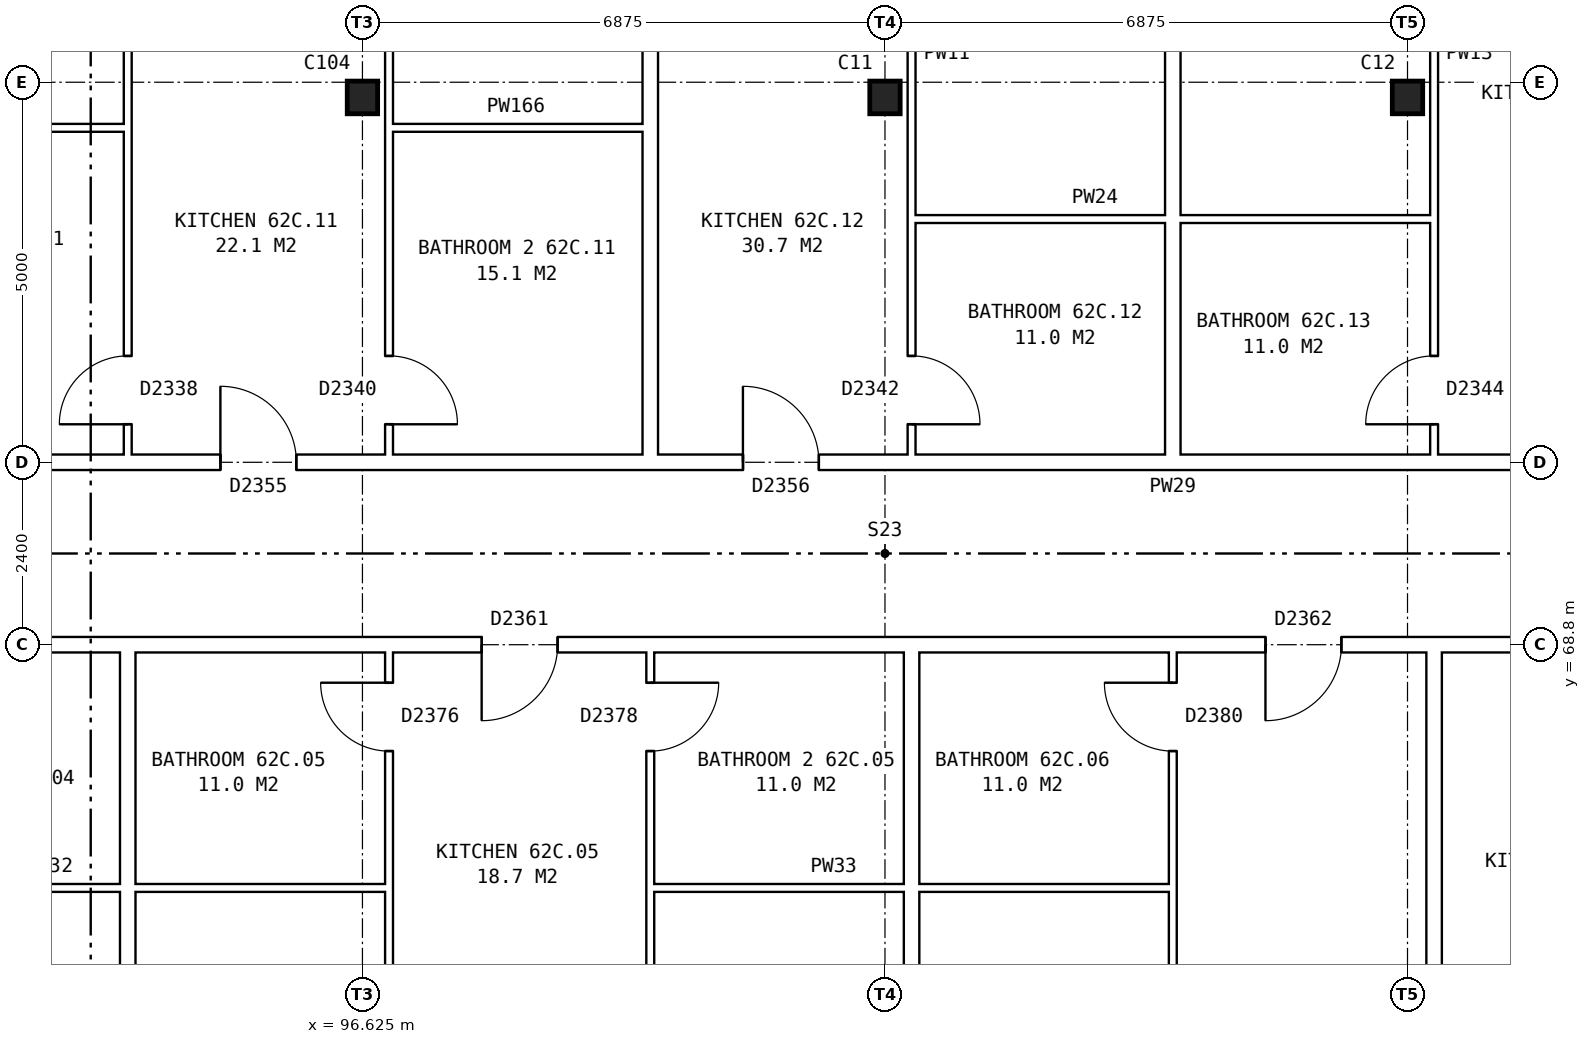
"""IFC4 building model, lengths in metres.
Left out: names, types, materials, properties, quantities, classifications, styles, units other than length and angle.
Written with IfcOpenShell. Run it as: python <this file> out.ifc"""

import sys

from ifc_helpers import new_model, si_unit, direction, frame, frame_2d, origin, origin_2d, place, context, subcontext, project, spatial, rectangle, i_section, extrude, element, fill, save


model = new_model("IFC4")
c1 = context("Model", 3, precision=1e-05, world=origin(), true_north=direction((0.0, 1.0)))
c2 = subcontext(c1, "Body", "Model", "MODEL_VIEW")
j1 = project(units=[si_unit("LENGTHUNIT", "METRE"), si_unit("PLANEANGLEUNIT", "RADIAN")], contexts=[c1])
p1 = place(None, origin())
s1 = spatial("IfcSite", under=j1, at=p1, CompositionType="ELEMENT")
p2 = place(p1, origin())
s2 = spatial("IfcBuilding", under=s1, at=p2, CompositionType="ELEMENT")
p3 = place(p2, frame((0.0, 0.0, 221.4)))
s3 = spatial("IfcBuildingStorey", under=s2, at=p3, CompositionType="ELEMENT", Elevation=221.4)
for number, where, z_axis, x_axis in (
    (1, (96.625, 76.0, 0.0), (0.0, 0.0, 1.0), (1.0, 0.0, 0.0)),
    (2, (103.5, 76.0, 0.0), (0.0, 0.0, 1.0), (1.0, 0.0, 0.0)),
    (3, (110.375, 76.0, 0.0), (0.0, 0.0, 1.0), (1.0, 0.0, 0.0)),
):
    element("IfcColumn", number, at=place(p3, frame(where, z_axis=z_axis, x_axis=x_axis)), inside=s3, PredefinedType="COLUMN", context=c2, shape_type="SweptSolid", body=[
        extrude(i_section(OverallWidth=0.4, OverallDepth=0.43, WebThickness=0.04, FlangeThickness=0.04, at=origin_2d()), origin(), (0.0, 0.0, 1.0), 2.85),
    ])
for number, where, z_axis, x_axis in (
    (4, (90.1, 65.6, 0.0), (0.0, 0.0, 1.0), (1.0, 0.0, 0.0)),
    (5, (100.412, 65.6, 0.0), (0.0, 0.0, 1.0), (1.0, 0.0, 0.0)),
):
    element("IfcWall", number, at=place(p3, frame(where, z_axis=z_axis, x_axis=x_axis)), inside=s3, PredefinedType="PARTITIONING", context=c2, shape_type="SweptSolid", body=[
        extrude(rectangle(XDim=6.875, YDim=0.1, at=frame_2d((3.438, 0.0))), origin(), (0.0, 0.0, 1.0), 2.85),
    ])
p4 = place(p3, frame((75.64, 68.8, 0.0), z_axis=(0.0, 0.0, 1.0), x_axis=(1.0, 0.0, 0.0)))
e6 = element("IfcWall", 6, at=p4, inside=s3, PredefinedType="PARTITIONING", context=c2, shape_type="SweptSolid", body=[
    extrude(rectangle(XDim=55.72, YDim=0.2, at=frame_2d((27.86, 0.0))), origin(), (0.0, 0.0, 1.0), 2.85),
])
p5 = place(p4, frame((1.399, 0.0, 0.0)))
e7 = element("IfcOpeningElement", 7, at=p5, cuts=e6, PredefinedType="OPENING", context=c2, shape_type="SweptSolid", body=[
    extrude(rectangle(XDim=1.0, YDim=2.1, at=frame_2d((0.5, 1.05))), frame((0.0, 0.11, 0.0), z_axis=(0.0, -1.0, 0.0), x_axis=(1.0, 0.0, 0.0)), (0.0, 0.0, 1.0), 0.22),
])
p6 = place(p4, frame((12.241, 0.0, 0.0)))
e8 = element("IfcOpeningElement", 8, at=p6, cuts=e6, PredefinedType="OPENING", context=c2, shape_type="SweptSolid", body=[
    extrude(rectangle(XDim=1.0, YDim=2.1, at=frame_2d((0.5, 1.05))), frame((0.0, 0.11, 0.0), z_axis=(0.0, -1.0, 0.0), x_axis=(1.0, 0.0, 0.0)), (0.0, 0.0, 1.0), 0.22),
])
p7 = place(p4, frame((22.553, 0.0, 0.0)))
e9 = element("IfcOpeningElement", 9, at=p7, cuts=e6, PredefinedType="OPENING", context=c2, shape_type="SweptSolid", body=[
    extrude(rectangle(XDim=1.0, YDim=2.1, at=frame_2d((0.5, 1.05))), frame((0.0, 0.11, 0.0), z_axis=(0.0, -1.0, 0.0), x_axis=(1.0, 0.0, 0.0)), (0.0, 0.0, 1.0), 0.22),
])
p8 = place(p4, frame((32.866, 0.0, 0.0)))
e10 = element("IfcOpeningElement", 10, at=p8, cuts=e6, PredefinedType="OPENING", context=c2, shape_type="SweptSolid", body=[
    extrude(rectangle(XDim=1.0, YDim=2.1, at=frame_2d((0.5, 1.05))), frame((0.0, 0.11, 0.0), z_axis=(0.0, -1.0, 0.0), x_axis=(1.0, 0.0, 0.0)), (0.0, 0.0, 1.0), 0.22),
])
p9 = place(p4, frame((36.303, 0.0, 0.0)))
e11 = element("IfcOpeningElement", 11, at=p9, cuts=e6, PredefinedType="OPENING", context=c2, shape_type="SweptSolid", body=[
    extrude(rectangle(XDim=1.0, YDim=2.1, at=frame_2d((0.5, 1.05))), frame((0.0, 0.11, 0.0), z_axis=(0.0, -1.0, 0.0), x_axis=(1.0, 0.0, 0.0)), (0.0, 0.0, 1.0), 0.22),
])
p10 = place(p4, frame((46.616, 0.0, 0.0)))
e12 = element("IfcOpeningElement", 12, at=p10, cuts=e6, PredefinedType="OPENING", context=c2, shape_type="SweptSolid", body=[
    extrude(rectangle(XDim=1.0, YDim=2.1, at=frame_2d((0.5, 1.05))), frame((0.0, 0.11, 0.0), z_axis=(0.0, -1.0, 0.0), x_axis=(1.0, 0.0, 0.0)), (0.0, 0.0, 1.0), 0.22),
])
p11 = place(p4, frame((50.053, 0.0, 0.0)))
e13 = element("IfcOpeningElement", 13, at=p11, cuts=e6, PredefinedType="OPENING", context=c2, shape_type="SweptSolid", body=[
    extrude(rectangle(XDim=1.0, YDim=2.1, at=frame_2d((0.5, 1.05))), frame((0.0, 0.11, 0.0), z_axis=(0.0, -1.0, 0.0), x_axis=(1.0, 0.0, 0.0)), (0.0, 0.0, 1.0), 0.22),
])
p12 = place(p3, frame((83.225, 71.2, 0.0), z_axis=(0.0, 0.0, 1.0), x_axis=(1.0, 0.0, 0.0)))
e14 = element("IfcWall", 14, at=p12, inside=s3, PredefinedType="PARTITIONING", context=c2, shape_type="SweptSolid", body=[
    extrude(rectangle(XDim=41.25, YDim=0.2, at=frame_2d((20.625, 0.0))), origin(), (0.0, 0.0, 1.0), 2.85),
])
p13 = place(p12, frame((4.656, 0.0, 0.0)))
e15 = element("IfcOpeningElement", 15, at=p13, cuts=e14, PredefinedType="OPENING", context=c2, shape_type="SweptSolid", body=[
    extrude(rectangle(XDim=1.0, YDim=2.1, at=frame_2d((0.5, 1.05))), frame((0.0, 0.11, 0.0), z_axis=(0.0, -1.0, 0.0), x_axis=(1.0, 0.0, 0.0)), (0.0, 0.0, 1.0), 0.22),
])
p14 = place(p12, frame((11.531, 0.0, 0.0)))
e16 = element("IfcOpeningElement", 16, at=p14, cuts=e14, PredefinedType="OPENING", context=c2, shape_type="SweptSolid", body=[
    extrude(rectangle(XDim=1.0, YDim=2.1, at=frame_2d((0.5, 1.05))), frame((0.0, 0.11, 0.0), z_axis=(0.0, -1.0, 0.0), x_axis=(1.0, 0.0, 0.0)), (0.0, 0.0, 1.0), 0.22),
])
p15 = place(p12, frame((18.406, 0.0, 0.0)))
e17 = element("IfcOpeningElement", 17, at=p15, cuts=e14, PredefinedType="OPENING", context=c2, shape_type="SweptSolid", body=[
    extrude(rectangle(XDim=1.0, YDim=2.1, at=frame_2d((0.5, 1.05))), frame((0.0, 0.11, 0.0), z_axis=(0.0, -1.0, 0.0), x_axis=(1.0, 0.0, 0.0)), (0.0, 0.0, 1.0), 0.22),
])
p16 = place(p12, frame((28.719, 0.0, 0.0)))
e18 = element("IfcOpeningElement", 18, at=p16, cuts=e14, PredefinedType="OPENING", context=c2, shape_type="SweptSolid", body=[
    extrude(rectangle(XDim=1.0, YDim=2.1, at=frame_2d((0.5, 1.05))), frame((0.0, 0.11, 0.0), z_axis=(0.0, -1.0, 0.0), x_axis=(1.0, 0.0, 0.0)), (0.0, 0.0, 1.0), 0.22),
])
p17 = place(p12, frame((35.594, 0.0, 0.0)))
e19 = element("IfcOpeningElement", 19, at=p17, cuts=e14, PredefinedType="OPENING", context=c2, shape_type="SweptSolid", body=[
    extrude(rectangle(XDim=1.0, YDim=2.1, at=frame_2d((0.5, 1.05))), frame((0.0, 0.11, 0.0), z_axis=(0.0, -1.0, 0.0), x_axis=(1.0, 0.0, 0.0)), (0.0, 0.0, 1.0), 0.22),
])
p18 = place(p3, frame((103.85, 74.4, 0.0), z_axis=(0.0, 0.0, 1.0), x_axis=(1.0, 0.0, 0.0)))
e20 = element("IfcWall", 20, at=p18, inside=s3, PredefinedType="PARTITIONING", context=c2, shape_type="SweptSolid", body=[
    extrude(rectangle(XDim=6.875, YDim=0.1, at=frame_2d((3.438, 0.0))), origin(), (0.0, 0.0, 1.0), 2.85),
])
p19 = place(p3, frame((90.2, 75.6, 0.0), z_axis=(0.0, 0.0, 1.0), x_axis=(1.0, 0.0, 0.0)))
e21 = element("IfcWall", 21, at=p19, inside=s3, PredefinedType="PARTITIONING", context=c2, shape_type="SweptSolid", body=[
    extrude(rectangle(XDim=3.337, YDim=0.1, at=frame_2d((1.668, 0.0))), origin(), (0.0, 0.0, 1.0), 2.85),
])
p20 = place(p3, frame((96.975, 75.6, 0.0), z_axis=(0.0, 0.0, 1.0), x_axis=(1.0, 0.0, 0.0)))
e22 = element("IfcWall", 22, at=p20, inside=s3, PredefinedType="PARTITIONING", context=c2, shape_type="SweptSolid", body=[
    extrude(rectangle(XDim=3.337, YDim=0.1, at=frame_2d((1.668, 0.0))), origin(), (0.0, 0.0, 1.0), 2.85),
])
p21 = place(p3, frame((93.537, 54.36, 0.0), z_axis=(0.0, 0.0, 1.0), x_axis=(0.0, 1.0, 0.0)))
e23 = element("IfcWall", 23, at=p21, inside=s3, PredefinedType="PARTITIONING", context=c2, shape_type="SweptSolid", body=[
    extrude(rectangle(XDim=14.34, YDim=0.2, at=frame_2d((7.17, 0.0))), origin(), (0.0, 0.0, 1.0), 2.85),
])
p22 = place(p3, frame((93.537, 71.3, 0.0), z_axis=(0.0, 0.0, 1.0), x_axis=(0.0, 1.0, 0.0)))
e24 = element("IfcWall", 24, at=p22, inside=s3, PredefinedType="PARTITIONING", context=c2, shape_type="SweptSolid", body=[
    extrude(rectangle(XDim=14.34, YDim=0.1, at=frame_2d((7.17, 0.0))), origin(), (0.0, 0.0, 1.0), 2.85),
])
p23 = place(p22, frame((6.74, 0.0, 0.0)))
e25 = element("IfcOpeningElement", 25, at=p23, cuts=e24, PredefinedType="OPENING", context=c2, shape_type="SweptSolid", body=[
    extrude(rectangle(XDim=0.9, YDim=2.1, at=frame_2d((0.45, 1.05))), frame((0.0, 0.06, 0.0), z_axis=(0.0, -1.0, 0.0), x_axis=(1.0, 0.0, 0.0)), (0.0, 0.0, 1.0), 0.12),
])
p24 = place(p22, frame((0.4, 0.0, 0.0)))
e26 = element("IfcOpeningElement", 26, at=p24, cuts=e24, PredefinedType="OPENING", context=c2, shape_type="SweptSolid", body=[
    extrude(rectangle(XDim=0.9, YDim=2.1, at=frame_2d((0.45, 1.05))), frame((0.0, 0.06, 0.0), z_axis=(0.0, -1.0, 0.0), x_axis=(1.0, 0.0, 0.0)), (0.0, 0.0, 1.0), 0.12),
])
p25 = place(p3, frame((96.975, 54.36, 0.0), z_axis=(0.0, 0.0, 1.0), x_axis=(0.0, 1.0, 0.0)))
e27 = element("IfcWall", 27, at=p25, inside=s3, PredefinedType="PARTITIONING", context=c2, shape_type="SweptSolid", body=[
    extrude(rectangle(XDim=14.34, YDim=0.1, at=frame_2d((7.17, 0.0))), origin(), (0.0, 0.0, 1.0), 2.85),
])
p26 = place(p25, frame((7.7, 0.0, 0.0)))
e28 = element("IfcOpeningElement", 28, at=p26, cuts=e27, PredefinedType="OPENING", context=c2, shape_type="SweptSolid", body=[
    extrude(rectangle(XDim=0.9, YDim=2.1, at=frame_2d((0.45, 1.05))), frame((0.0, 0.06, 0.0), z_axis=(0.0, -1.0, 0.0), x_axis=(1.0, 0.0, 0.0)), (0.0, 0.0, 1.0), 0.12),
])
p27 = place(p25, frame((13.04, 0.0, 0.0)))
e29 = element("IfcOpeningElement", 29, at=p27, cuts=e27, PredefinedType="OPENING", context=c2, shape_type="SweptSolid", body=[
    extrude(rectangle(XDim=0.9, YDim=2.1, at=frame_2d((0.45, 1.05))), frame((0.0, 0.06, 0.0), z_axis=(0.0, -1.0, 0.0), x_axis=(1.0, 0.0, 0.0)), (0.0, 0.0, 1.0), 0.12),
])
p28 = place(p3, frame((96.975, 71.3, 0.0), z_axis=(0.0, 0.0, 1.0), x_axis=(0.0, 1.0, 0.0)))
e30 = element("IfcWall", 30, at=p28, inside=s3, PredefinedType="PARTITIONING", context=c2, shape_type="SweptSolid", body=[
    extrude(rectangle(XDim=14.34, YDim=0.1, at=frame_2d((7.17, 0.0))), origin(), (0.0, 0.0, 1.0), 2.85),
])
p29 = place(p28, frame((6.74, 0.0, 0.0)))
e31 = element("IfcOpeningElement", 31, at=p29, cuts=e30, PredefinedType="OPENING", context=c2, shape_type="SweptSolid", body=[
    extrude(rectangle(XDim=0.9, YDim=2.1, at=frame_2d((0.45, 1.05))), frame((0.0, 0.06, 0.0), z_axis=(0.0, -1.0, 0.0), x_axis=(1.0, 0.0, 0.0)), (0.0, 0.0, 1.0), 0.12),
])
p30 = place(p28, frame((0.4, 0.0, 0.0)))
e32 = element("IfcOpeningElement", 32, at=p30, cuts=e30, PredefinedType="OPENING", context=c2, shape_type="SweptSolid", body=[
    extrude(rectangle(XDim=0.9, YDim=2.1, at=frame_2d((0.45, 1.05))), frame((0.0, 0.06, 0.0), z_axis=(0.0, -1.0, 0.0), x_axis=(1.0, 0.0, 0.0)), (0.0, 0.0, 1.0), 0.12),
])
p31 = place(p3, frame((100.412, 54.36, 0.0), z_axis=(0.0, 0.0, 1.0), x_axis=(0.0, 1.0, 0.0)))
e33 = element("IfcWall", 33, at=p31, inside=s3, PredefinedType="PARTITIONING", context=c2, shape_type="SweptSolid", body=[
    extrude(rectangle(XDim=14.34, YDim=0.1, at=frame_2d((7.17, 0.0))), origin(), (0.0, 0.0, 1.0), 2.85),
])
p32 = place(p31, frame((7.7, 0.0, 0.0)))
e34 = element("IfcOpeningElement", 34, at=p32, cuts=e33, PredefinedType="OPENING", context=c2, shape_type="SweptSolid", body=[
    extrude(rectangle(XDim=0.9, YDim=2.1, at=frame_2d((0.45, 1.05))), frame((0.0, 0.06, 0.0), z_axis=(0.0, -1.0, 0.0), x_axis=(1.0, 0.0, 0.0)), (0.0, 0.0, 1.0), 0.12),
])
p33 = place(p31, frame((13.04, 0.0, 0.0)))
e35 = element("IfcOpeningElement", 35, at=p33, cuts=e33, PredefinedType="OPENING", context=c2, shape_type="SweptSolid", body=[
    extrude(rectangle(XDim=0.9, YDim=2.1, at=frame_2d((0.45, 1.05))), frame((0.0, 0.06, 0.0), z_axis=(0.0, -1.0, 0.0), x_axis=(1.0, 0.0, 0.0)), (0.0, 0.0, 1.0), 0.12),
])
for number, where, z_axis, x_axis in (
    (36, (100.412, 71.3, 0.0), (0.0, 0.0, 1.0), (0.0, 1.0, 0.0)),
    (37, (103.85, 54.36, 0.0), (0.0, 0.0, 1.0), (0.0, 1.0, 0.0)),
):
    element("IfcWall", number, at=place(p3, frame(where, z_axis=z_axis, x_axis=x_axis)), inside=s3, PredefinedType="PARTITIONING", context=c2, shape_type="SweptSolid", body=[
        extrude(rectangle(XDim=14.34, YDim=0.2, at=frame_2d((7.17, 0.0))), origin(), (0.0, 0.0, 1.0), 2.85),
    ])
p34 = place(p3, frame((103.85, 71.3, 0.0), z_axis=(0.0, 0.0, 1.0), x_axis=(0.0, 1.0, 0.0)))
e38 = element("IfcWall", 38, at=p34, inside=s3, PredefinedType="PARTITIONING", context=c2, shape_type="SweptSolid", body=[
    extrude(rectangle(XDim=14.34, YDim=0.1, at=frame_2d((7.17, 0.0))), origin(), (0.0, 0.0, 1.0), 2.85),
])
p35 = place(p34, frame((9.24, 0.0, 0.0)))
e39 = element("IfcOpeningElement", 39, at=p35, cuts=e38, PredefinedType="OPENING", context=c2, shape_type="SweptSolid", body=[
    extrude(rectangle(XDim=0.9, YDim=2.1, at=frame_2d((0.45, 1.05))), frame((0.0, 0.06, 0.0), z_axis=(0.0, -1.0, 0.0), x_axis=(1.0, 0.0, 0.0)), (0.0, 0.0, 1.0), 0.12),
])
p36 = place(p34, frame((0.4, 0.0, 0.0)))
e40 = element("IfcOpeningElement", 40, at=p36, cuts=e38, PredefinedType="OPENING", context=c2, shape_type="SweptSolid", body=[
    extrude(rectangle(XDim=0.9, YDim=2.1, at=frame_2d((0.45, 1.05))), frame((0.0, 0.06, 0.0), z_axis=(0.0, -1.0, 0.0), x_axis=(1.0, 0.0, 0.0)), (0.0, 0.0, 1.0), 0.12),
])
p37 = place(p3, frame((107.287, 54.36, 0.0), z_axis=(0.0, 0.0, 1.0), x_axis=(0.0, 1.0, 0.0)))
e41 = element("IfcWall", 41, at=p37, inside=s3, PredefinedType="PARTITIONING", context=c2, shape_type="SweptSolid", body=[
    extrude(rectangle(XDim=14.34, YDim=0.1, at=frame_2d((7.17, 0.0))), origin(), (0.0, 0.0, 1.0), 2.85),
])
p38 = place(p37, frame((4.2, 0.0, 0.0)))
e42 = element("IfcOpeningElement", 42, at=p38, cuts=e41, PredefinedType="OPENING", context=c2, shape_type="SweptSolid", body=[
    extrude(rectangle(XDim=0.9, YDim=2.1, at=frame_2d((0.45, 1.05))), frame((0.0, 0.06, 0.0), z_axis=(0.0, -1.0, 0.0), x_axis=(1.0, 0.0, 0.0)), (0.0, 0.0, 1.0), 0.12),
])
p39 = place(p37, frame((13.04, 0.0, 0.0)))
e43 = element("IfcOpeningElement", 43, at=p39, cuts=e41, PredefinedType="OPENING", context=c2, shape_type="SweptSolid", body=[
    extrude(rectangle(XDim=0.9, YDim=2.1, at=frame_2d((0.45, 1.05))), frame((0.0, 0.06, 0.0), z_axis=(0.0, -1.0, 0.0), x_axis=(1.0, 0.0, 0.0)), (0.0, 0.0, 1.0), 0.12),
])
for number, where, z_axis, x_axis in (
    (44, (107.287, 71.3, 0.0), (0.0, 0.0, 1.0), (0.0, 1.0, 0.0)),
    (45, (110.725, 54.36, 0.0), (0.0, 0.0, 1.0), (0.0, 1.0, 0.0)),
):
    element("IfcWall", number, at=place(p3, frame(where, z_axis=z_axis, x_axis=x_axis)), inside=s3, PredefinedType="PARTITIONING", context=c2, shape_type="SweptSolid", body=[
        extrude(rectangle(XDim=14.34, YDim=0.2, at=frame_2d((7.17, 0.0))), origin(), (0.0, 0.0, 1.0), 2.85),
    ])
p40 = place(p3, frame((110.725, 71.3, 0.0), z_axis=(0.0, 0.0, 1.0), x_axis=(0.0, 1.0, 0.0)))
e46 = element("IfcWall", 46, at=p40, inside=s3, PredefinedType="PARTITIONING", context=c2, shape_type="SweptSolid", body=[
    extrude(rectangle(XDim=14.34, YDim=0.1, at=frame_2d((7.17, 0.0))), origin(), (0.0, 0.0, 1.0), 2.85),
])
p41 = place(p40, frame((9.24, 0.0, 0.0)))
e47 = element("IfcOpeningElement", 47, at=p41, cuts=e46, PredefinedType="OPENING", context=c2, shape_type="SweptSolid", body=[
    extrude(rectangle(XDim=0.9, YDim=2.1, at=frame_2d((0.45, 1.05))), frame((0.0, 0.06, 0.0), z_axis=(0.0, -1.0, 0.0), x_axis=(1.0, 0.0, 0.0)), (0.0, 0.0, 1.0), 0.12),
])
p42 = place(p40, frame((0.4, 0.0, 0.0)))
e48 = element("IfcOpeningElement", 48, at=p42, cuts=e46, PredefinedType="OPENING", context=c2, shape_type="SweptSolid", body=[
    extrude(rectangle(XDim=0.9, YDim=2.1, at=frame_2d((0.45, 1.05))), frame((0.0, 0.06, 0.0), z_axis=(0.0, -1.0, 0.0), x_axis=(1.0, 0.0, 0.0)), (0.0, 0.0, 1.0), 0.12),
])
p43 = place(p7, frame((1.0, 0.0, 0.0), z_axis=(0.0, 0.0, 1.0), x_axis=(-1.0, 0.0, 0.0)))
e49 = element("IfcDoor", 49, at=p43, inside=s3, OperationType="SINGLE_SWING_RIGHT", PredefinedType="DOOR", context=c2, shape_type="SweptSolid", body=[
    extrude(rectangle(XDim=1.0, YDim=2.1, at=frame_2d((0.5, 1.05))), frame((0.0, 0.025, 0.0), z_axis=(0.0, -1.0, 0.0), x_axis=(1.0, 0.0, 0.0)), (0.0, 0.0, 1.0), 0.05),
])
fill(e9, e49)
p44 = place(p27, origin())
e50 = element("IfcDoor", 50, at=p44, inside=s3, OperationType="SINGLE_SWING_RIGHT", PredefinedType="DOOR", context=c2, shape_type="SweptSolid", body=[
    extrude(rectangle(XDim=0.9, YDim=2.1, at=frame_2d((0.45, 1.05))), frame((0.0, 0.025, 0.0), z_axis=(0.0, -1.0, 0.0), x_axis=(1.0, 0.0, 0.0)), (0.0, 0.0, 1.0), 0.05),
])
fill(e29, e50)
p45 = place(p33, frame((0.9, 0.0, 0.0), z_axis=(0.0, 0.0, 1.0), x_axis=(-1.0, 0.0, 0.0)))
e51 = element("IfcDoor", 51, at=p45, inside=s3, OperationType="SINGLE_SWING_LEFT", PredefinedType="DOOR", context=c2, shape_type="SweptSolid", body=[
    extrude(rectangle(XDim=0.9, YDim=2.1, at=frame_2d((0.45, 1.05))), frame((0.0, 0.025, 0.0), z_axis=(0.0, -1.0, 0.0), x_axis=(1.0, 0.0, 0.0)), (0.0, 0.0, 1.0), 0.05),
])
fill(e35, e51)
p46 = place(p8, frame((1.0, 0.0, 0.0), z_axis=(0.0, 0.0, 1.0), x_axis=(-1.0, 0.0, 0.0)))
e52 = element("IfcDoor", 52, at=p46, inside=s3, OperationType="SINGLE_SWING_RIGHT", PredefinedType="DOOR", context=c2, shape_type="SweptSolid", body=[
    extrude(rectangle(XDim=1.0, YDim=2.1, at=frame_2d((0.5, 1.05))), frame((0.0, 0.025, 0.0), z_axis=(0.0, -1.0, 0.0), x_axis=(1.0, 0.0, 0.0)), (0.0, 0.0, 1.0), 0.05),
])
fill(e10, e52)
p47 = place(p39, origin())
e53 = element("IfcDoor", 53, at=p47, inside=s3, OperationType="SINGLE_SWING_RIGHT", PredefinedType="DOOR", context=c2, shape_type="SweptSolid", body=[
    extrude(rectangle(XDim=0.9, YDim=2.1, at=frame_2d((0.45, 1.05))), frame((0.0, 0.025, 0.0), z_axis=(0.0, -1.0, 0.0), x_axis=(1.0, 0.0, 0.0)), (0.0, 0.0, 1.0), 0.05),
])
fill(e43, e53)
p48 = place(p14, origin())
e54 = element("IfcDoor", 54, at=p48, inside=s3, OperationType="SINGLE_SWING_LEFT", PredefinedType="DOOR", context=c2, shape_type="SweptSolid", body=[
    extrude(rectangle(XDim=1.0, YDim=2.1, at=frame_2d((0.5, 1.05))), frame((0.0, 0.025, 0.0), z_axis=(0.0, -1.0, 0.0), x_axis=(1.0, 0.0, 0.0)), (0.0, 0.0, 1.0), 0.05),
])
fill(e16, e54)
p49 = place(p24, origin())
e55 = element("IfcDoor", 55, at=p49, inside=s3, OperationType="SINGLE_SWING_LEFT", PredefinedType="DOOR", context=c2, shape_type="SweptSolid", body=[
    extrude(rectangle(XDim=0.9, YDim=2.1, at=frame_2d((0.45, 1.05))), frame((0.0, 0.025, 0.0), z_axis=(0.0, -1.0, 0.0), x_axis=(1.0, 0.0, 0.0)), (0.0, 0.0, 1.0), 0.05),
])
fill(e26, e55)
p50 = place(p30, frame((0.9, 0.0, 0.0), z_axis=(0.0, 0.0, 1.0), x_axis=(-1.0, 0.0, 0.0)))
e56 = element("IfcDoor", 56, at=p50, inside=s3, OperationType="SINGLE_SWING_RIGHT", PredefinedType="DOOR", context=c2, shape_type="SweptSolid", body=[
    extrude(rectangle(XDim=0.9, YDim=2.1, at=frame_2d((0.45, 1.05))), frame((0.0, 0.025, 0.0), z_axis=(0.0, -1.0, 0.0), x_axis=(1.0, 0.0, 0.0)), (0.0, 0.0, 1.0), 0.05),
])
fill(e32, e56)
p51 = place(p15, origin())
e57 = element("IfcDoor", 57, at=p51, inside=s3, OperationType="SINGLE_SWING_LEFT", PredefinedType="DOOR", context=c2, shape_type="SweptSolid", body=[
    extrude(rectangle(XDim=1.0, YDim=2.1, at=frame_2d((0.5, 1.05))), frame((0.0, 0.025, 0.0), z_axis=(0.0, -1.0, 0.0), x_axis=(1.0, 0.0, 0.0)), (0.0, 0.0, 1.0), 0.05),
])
fill(e17, e57)
p52 = place(p36, frame((0.9, 0.0, 0.0), z_axis=(0.0, 0.0, 1.0), x_axis=(-1.0, 0.0, 0.0)))
e58 = element("IfcDoor", 58, at=p52, inside=s3, OperationType="SINGLE_SWING_RIGHT", PredefinedType="DOOR", context=c2, shape_type="SweptSolid", body=[
    extrude(rectangle(XDim=0.9, YDim=2.1, at=frame_2d((0.45, 1.05))), frame((0.0, 0.025, 0.0), z_axis=(0.0, -1.0, 0.0), x_axis=(1.0, 0.0, 0.0)), (0.0, 0.0, 1.0), 0.05),
])
fill(e40, e58)
p53 = place(p42, origin())
e59 = element("IfcDoor", 59, at=p53, inside=s3, OperationType="SINGLE_SWING_LEFT", PredefinedType="DOOR", context=c2, shape_type="SweptSolid", body=[
    extrude(rectangle(XDim=0.9, YDim=2.1, at=frame_2d((0.45, 1.05))), frame((0.0, 0.025, 0.0), z_axis=(0.0, -1.0, 0.0), x_axis=(1.0, 0.0, 0.0)), (0.0, 0.0, 1.0), 0.05),
])
fill(e48, e59)
save(model, sys.argv[1])
